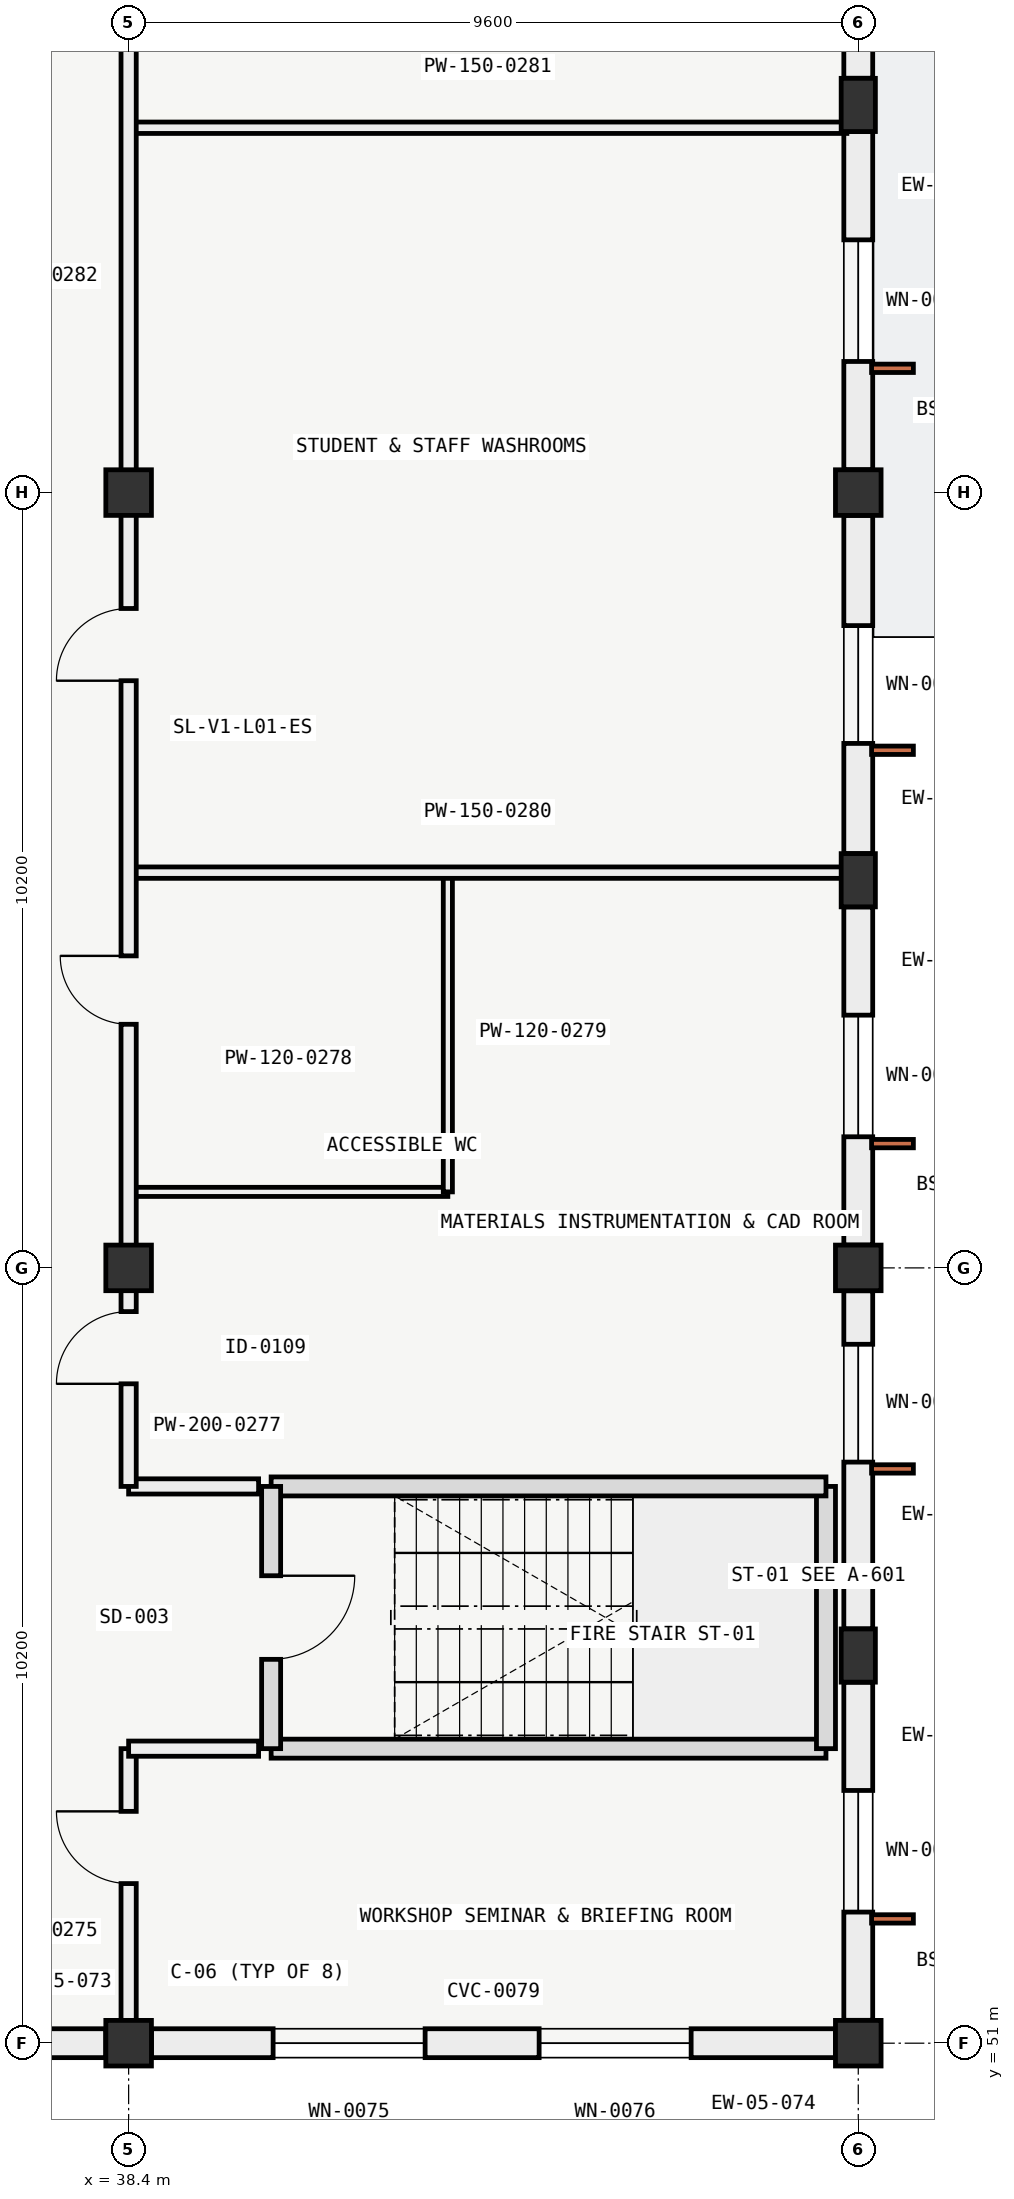
"""IFC4 building model, lengths in metres.
Left out: names, types, materials, properties, quantities, classifications, styles, units other than length and angle.
Written with IfcOpenShell. Run it as: python <this file> out.ifc"""

import sys

from ifc_helpers import new_model, si_unit, direction, frame, frame_2d, origin, origin_2d, place, context, subcontext, project, spatial, rectangle, extrude, element, fill, save


model = new_model("IFC4")
c1 = context("Model", 3, precision=1e-05, world=origin(), true_north=direction((0.0, 1.0)))
c2 = subcontext(c1, "Body", "Model", "MODEL_VIEW")
j1 = project(units=[si_unit("LENGTHUNIT", "METRE"), si_unit("PLANEANGLEUNIT", "RADIAN")], contexts=[c1])
p1 = place(None, origin())
s1 = spatial("IfcSite", under=j1, at=p1, CompositionType="ELEMENT")
p2 = place(p1, origin())
s2 = spatial("IfcBuilding", under=s1, at=p2, CompositionType="ELEMENT")
p3 = place(p2, frame((0.0, 0.0, 5.4)))
s3 = spatial("IfcBuildingStorey", under=s2, at=p3, CompositionType="ELEMENT", Elevation=5.4)
for number, where, z_axis, x_axis in (
    (1, (38.4, 51.0, 0.0), (0.0, 0.0, 1.0), (1.0, 0.0, 0.0)),
    (2, (48.0, 51.0, 0.0), (0.0, 0.0, 1.0), (1.0, 0.0, 0.0)),
    (3, (38.4, 61.2, 0.0), (0.0, 0.0, 1.0), (1.0, 0.0, 0.0)),
    (4, (48.0, 61.2, 0.0), (0.0, 0.0, 1.0), (1.0, 0.0, 0.0)),
    (5, (38.4, 71.4, 0.0), (0.0, 0.0, 1.0), (1.0, 0.0, 0.0)),
    (6, (48.0, 71.4, 0.0), (0.0, 0.0, 1.0), (1.0, 0.0, 0.0)),
):
    element("IfcColumn", number, at=place(p3, frame(where, z_axis=z_axis, x_axis=x_axis)), inside=s3, PredefinedType="COLUMN", context=c2, shape_type="SweptSolid", body=[
        extrude(rectangle(XDim=0.6, YDim=0.6, at=origin_2d()), origin(), (0.0, 0.0, 1.0), 4.2),
    ])
for number, where, z_axis, x_axis in (
    (7, (48.0, 56.1, 0.0), (0.0, 0.0, 1.0), (1.0, 0.0, 0.0)),
    (8, (48.0, 66.3, 0.0), (0.0, 0.0, 1.0), (1.0, 0.0, 0.0)),
    (9, (48.0, 76.5, 0.0), (0.0, 0.0, 1.0), (1.0, 0.0, 0.0)),
):
    element("IfcColumn", number, at=place(p3, frame(where, z_axis=z_axis, x_axis=x_axis)), inside=s3, PredefinedType="PILASTER", context=c2, shape_type="SweptSolid", body=[
        extrude(rectangle(XDim=0.45, YDim=0.7, at=origin_2d()), origin(), (0.0, 0.0, 1.0), 4.2),
    ])
p4 = place(p3, frame((48.0, 55.749, 0.0), z_axis=(0.0, 0.0, 1.0), x_axis=(0.0, -1.0, 0.0)))
e10 = element("IfcWall", 10, at=p4, inside=s3, PredefinedType="SOLIDWALL", context=c2, shape_type="SweptSolid", body=[
    extrude(rectangle(XDim=4.448, YDim=0.38, at=frame_2d((2.224, 0.0))), origin(), (0.0, 0.0, 1.0), 3.25),
])
p5 = place(p4, frame((1.424, 0.0, 0.95)))
e11 = element("IfcOpeningElement", 11, at=p5, cuts=e10, PredefinedType="OPENING", context=c2, shape_type="SweptSolid", body=[
    extrude(rectangle(XDim=1.6, YDim=1.9, at=frame_2d((0.8, 0.95))), frame((0.0, 0.2, 0.0), z_axis=(0.0, -1.0, 0.0), x_axis=(1.0, 0.0, 0.0)), (0.0, 0.0, 1.0), 0.4),
])
p6 = place(p3, frame((48.0, 60.899, 0.0), z_axis=(0.0, 0.0, 1.0), x_axis=(0.0, -1.0, 0.0)))
e12 = element("IfcWall", 12, at=p6, inside=s3, PredefinedType="SOLIDWALL", context=c2, shape_type="SweptSolid", body=[
    extrude(rectangle(XDim=4.448, YDim=0.38, at=frame_2d((2.224, 0.0))), origin(), (0.0, 0.0, 1.0), 3.25),
])
p7 = place(p6, frame((0.704, 0.0, 0.95)))
e13 = element("IfcOpeningElement", 13, at=p7, cuts=e12, PredefinedType="OPENING", context=c2, shape_type="SweptSolid", body=[
    extrude(rectangle(XDim=1.55, YDim=1.85, at=frame_2d((0.775, 0.925))), frame((0.0, 0.2, 0.0), z_axis=(0.0, -1.0, 0.0), x_axis=(1.0, 0.0, 0.0)), (0.0, 0.0, 1.0), 0.4),
])
p8 = place(p3, frame((48.0, 65.949, 0.0), z_axis=(0.0, 0.0, 1.0), x_axis=(0.0, -1.0, 0.0)))
e14 = element("IfcWall", 14, at=p8, inside=s3, PredefinedType="SOLIDWALL", context=c2, shape_type="SweptSolid", body=[
    extrude(rectangle(XDim=4.448, YDim=0.38, at=frame_2d((2.224, 0.0))), origin(), (0.0, 0.0, 1.0), 3.25),
])
p9 = place(p8, frame((1.424, 0.0, 0.95)))
e15 = element("IfcOpeningElement", 15, at=p9, cuts=e14, PredefinedType="OPENING", context=c2, shape_type="SweptSolid", body=[
    extrude(rectangle(XDim=1.6, YDim=1.9, at=frame_2d((0.8, 0.95))), frame((0.0, 0.2, 0.0), z_axis=(0.0, -1.0, 0.0), x_axis=(1.0, 0.0, 0.0)), (0.0, 0.0, 1.0), 0.4),
])
p10 = place(p3, frame((48.0, 71.099, 0.0), z_axis=(0.0, 0.0, 1.0), x_axis=(0.0, -1.0, 0.0)))
e16 = element("IfcWall", 16, at=p10, inside=s3, PredefinedType="SOLIDWALL", context=c2, shape_type="SweptSolid", body=[
    extrude(rectangle(XDim=4.448, YDim=0.38, at=frame_2d((2.224, 0.0))), origin(), (0.0, 0.0, 1.0), 3.25),
])
p11 = place(p10, frame((1.449, 0.0, 0.95)))
e17 = element("IfcOpeningElement", 17, at=p11, cuts=e16, PredefinedType="OPENING", context=c2, shape_type="SweptSolid", body=[
    extrude(rectangle(XDim=1.55, YDim=1.85, at=frame_2d((0.775, 0.925))), frame((0.0, 0.2, 0.0), z_axis=(0.0, -1.0, 0.0), x_axis=(1.0, 0.0, 0.0)), (0.0, 0.0, 1.0), 0.4),
])
p12 = place(p3, frame((48.0, 76.149, 0.0), z_axis=(0.0, 0.0, 1.0), x_axis=(0.0, -1.0, 0.0)))
e18 = element("IfcWall", 18, at=p12, inside=s3, PredefinedType="SOLIDWALL", context=c2, shape_type="SweptSolid", body=[
    extrude(rectangle(XDim=4.448, YDim=0.38, at=frame_2d((2.224, 0.0))), origin(), (0.0, 0.0, 1.0), 3.25),
])
p13 = place(p12, frame((1.424, 0.0, 0.95)))
e19 = element("IfcOpeningElement", 19, at=p13, cuts=e18, PredefinedType="OPENING", context=c2, shape_type="SweptSolid", body=[
    extrude(rectangle(XDim=1.6, YDim=1.9, at=frame_2d((0.8, 0.95))), frame((0.0, 0.2, 0.0), z_axis=(0.0, -1.0, 0.0), x_axis=(1.0, 0.0, 0.0)), (0.0, 0.0, 1.0), 0.4),
])
p14 = place(p3, frame((48.0, 81.299, 0.0), z_axis=(0.0, 0.0, 1.0), x_axis=(0.0, -1.0, 0.0)))
e20 = element("IfcWall", 20, at=p14, inside=s3, PredefinedType="SOLIDWALL", context=c2, shape_type="SweptSolid", body=[
    extrude(rectangle(XDim=4.448, YDim=0.38, at=frame_2d((2.224, 0.0))), origin(), (0.0, 0.0, 1.0), 3.25),
])
p15 = place(p14, frame((1.449, 0.0, 0.95)))
e21 = element("IfcOpeningElement", 21, at=p15, cuts=e20, PredefinedType="OPENING", context=c2, shape_type="SweptSolid", body=[
    extrude(rectangle(XDim=1.55, YDim=1.85, at=frame_2d((0.775, 0.925))), frame((0.0, 0.2, 0.0), z_axis=(0.0, -1.0, 0.0), x_axis=(1.0, 0.0, 0.0)), (0.0, 0.0, 1.0), 0.4),
])
p16 = place(p3, frame((38.099, 51.0, 0.0), z_axis=(0.0, 0.0, 1.0), x_axis=(-1.0, 0.0, 0.0)))
e22 = element("IfcWall", 22, at=p16, inside=s3, PredefinedType="SOLIDWALL", context=c2, shape_type="SweptSolid", body=[
    extrude(rectangle(XDim=2.699, YDim=0.38, at=frame_2d((1.35, 0.0))), origin(), (0.0, 0.0, 1.0), 3.298),
])
p17 = place(p16, frame((0.899, 0.0, 0.85)))
e23 = element("IfcOpeningElement", 23, at=p17, cuts=e22, PredefinedType="OPENING", context=c2, shape_type="SweptSolid", body=[
    extrude(rectangle(XDim=0.9, YDim=2.2, at=frame_2d((0.45, 1.1))), frame((0.0, 0.2, 0.0), z_axis=(0.0, -1.0, 0.0), x_axis=(1.0, 0.0, 0.0)), (0.0, 0.0, 1.0), 0.4),
])
p18 = place(p3, frame((47.699, 51.0, 0.0), z_axis=(0.0, 0.0, 1.0), x_axis=(-1.0, 0.0, 0.0)))
e24 = element("IfcWall", 24, at=p18, inside=s3, PredefinedType="SOLIDWALL", context=c2, shape_type="SweptSolid", body=[
    extrude(rectangle(XDim=8.998, YDim=0.38, at=frame_2d((4.499, 0.0))), origin(), (0.0, 0.0, 1.0), 3.32),
])
p19 = place(p18, frame((5.398, 0.0, 0.85)))
e25 = element("IfcOpeningElement", 25, at=p19, cuts=e24, PredefinedType="OPENING", context=c2, shape_type="SweptSolid", body=[
    extrude(rectangle(XDim=2.0, YDim=1.35, at=frame_2d((1.0, 0.675))), frame((0.0, 0.2, 0.0), z_axis=(0.0, -1.0, 0.0), x_axis=(1.0, 0.0, 0.0)), (0.0, 0.0, 1.0), 0.4),
])
p20 = place(p18, frame((1.898, 0.0, 0.85)))
e26 = element("IfcOpeningElement", 26, at=p20, cuts=e24, PredefinedType="OPENING", context=c2, shape_type="SweptSolid", body=[
    extrude(rectangle(XDim=2.0, YDim=1.35, at=frame_2d((1.0, 0.675))), frame((0.0, 0.2, 0.0), z_axis=(0.0, -1.0, 0.0), x_axis=(1.0, 0.0, 0.0)), (0.0, 0.0, 1.0), 0.4),
])
p21 = place(p3, frame((40.275, 54.875, 0.0), z_axis=(0.0, 0.0, 1.0), x_axis=(1.0, 0.0, 0.0)))
e27 = element("IfcWall", 27, at=p21, inside=s3, PredefinedType="SOLIDWALL", context=c2, shape_type="SweptSolid", body=[
    extrude(rectangle(XDim=7.3, YDim=0.25, at=frame_2d((3.65, 0.0))), origin(), (0.0, 0.0, 1.0), 3.92),
])
p22 = place(p3, frame((47.575, 54.875, 0.0), z_axis=(0.0, 0.0, 1.0), x_axis=(0.0, 1.0, 0.0)))
e28 = element("IfcWall", 28, at=p22, inside=s3, PredefinedType="SOLIDWALL", context=c2, shape_type="SweptSolid", body=[
    extrude(rectangle(XDim=3.45, YDim=0.25, at=frame_2d((1.725, 0.0))), origin(), (0.0, 0.0, 1.0), 3.92),
])
p23 = place(p3, frame((47.575, 58.325, 0.0), z_axis=(0.0, 0.0, 1.0), x_axis=(-1.0, 0.0, 0.0)))
e29 = element("IfcWall", 29, at=p23, inside=s3, PredefinedType="SOLIDWALL", context=c2, shape_type="SweptSolid", body=[
    extrude(rectangle(XDim=7.3, YDim=0.25, at=frame_2d((3.65, 0.0))), origin(), (0.0, 0.0, 1.0), 3.92),
])
p24 = place(p3, frame((40.275, 58.325, 0.0), z_axis=(0.0, 0.0, 1.0), x_axis=(0.0, -1.0, 0.0)))
e30 = element("IfcWall", 30, at=p24, inside=s3, PredefinedType="SOLIDWALL", context=c2, shape_type="SweptSolid", body=[
    extrude(rectangle(XDim=3.45, YDim=0.25, at=frame_2d((1.725, 0.0))), origin(), (0.0, 0.0, 1.0), 3.92),
])
p25 = place(p24, frame((1.175, 0.0, 0.0)))
e31 = element("IfcOpeningElement", 31, at=p25, cuts=e30, PredefinedType="OPENING", context=c2, shape_type="SweptSolid", body=[
    extrude(rectangle(XDim=1.1, YDim=2.2, at=frame_2d((0.55, 1.1))), frame((0.0, 0.135, 0.0), z_axis=(0.0, -1.0, 0.0), x_axis=(1.0, 0.0, 0.0)), (0.0, 0.0, 1.0), 0.27),
])
p26 = place(p3, frame((38.4, 51.15, 0.0), z_axis=(0.0, 0.0, 1.0), x_axis=(0.0, 1.0, 0.0)))
e32 = element("IfcWall", 32, at=p26, inside=s3, PredefinedType="PARTITIONING", context=c2, shape_type="SweptSolid", body=[
    extrude(rectangle(XDim=3.725, YDim=0.2, at=frame_2d((1.863, 0.0))), origin(), (0.0, 0.0, 1.0), 3.443),
])
p27 = place(p26, frame((1.95, 0.0, 0.0)))
e33 = element("IfcOpeningElement", 33, at=p27, cuts=e32, PredefinedType="OPENING", context=c2, shape_type="SweptSolid", body=[
    extrude(rectangle(XDim=0.95, YDim=2.1, at=frame_2d((0.475, 1.05))), frame((0.0, 0.11, 0.0), z_axis=(0.0, -1.0, 0.0), x_axis=(1.0, 0.0, 0.0)), (0.0, 0.0, 1.0), 0.22),
])
for number, where, z_axis, x_axis in (
    (34, (38.4, 54.875, 0.0), (0.0, 0.0, 1.0), (1.0, 0.0, 0.0)),
    (35, (38.4, 58.325, 0.0), (0.0, 0.0, 1.0), (1.0, 0.0, 0.0)),
):
    element("IfcWall", number, at=place(p3, frame(where, z_axis=z_axis, x_axis=x_axis)), inside=s3, PredefinedType="PARTITIONING", context=c2, shape_type="SweptSolid", body=[
        extrude(rectangle(XDim=1.71, YDim=0.2, at=frame_2d((0.855, 0.0))), origin(), (0.0, 0.0, 1.0), 3.443),
    ])
p28 = place(p3, frame((38.4, 62.2, 0.0), z_axis=(0.0, 0.0, 1.0), x_axis=(1.0, 0.0, 0.0)))
e36 = element("IfcWall", 36, at=p28, inside=s3, PredefinedType="PARTITIONING", context=c2, shape_type="SweptSolid", body=[
    extrude(rectangle(XDim=4.2, YDim=0.12, at=frame_2d((2.1, 0.0))), origin(), (0.0, 0.0, 1.0), 3.443),
])
p29 = place(p3, frame((42.6, 62.2, 0.0), z_axis=(0.0, 0.0, 1.0), x_axis=(0.0, 1.0, 0.0)))
e37 = element("IfcWall", 37, at=p29, inside=s3, PredefinedType="PARTITIONING", context=c2, shape_type="SweptSolid", body=[
    extrude(rectangle(XDim=4.2, YDim=0.12, at=frame_2d((2.1, 0.0))), origin(), (0.0, 0.0, 1.0), 3.596),
])
for number, where, z_axis, x_axis in (
    (38, (38.4, 66.4, 0.0), (0.0, 0.0, 1.0), (1.0, 0.0, 0.0)),
    (39, (38.4, 76.2, 0.0), (0.0, 0.0, 1.0), (1.0, 0.0, 0.0)),
):
    element("IfcWall", number, at=place(p3, frame(where, z_axis=z_axis, x_axis=x_axis)), inside=s3, PredefinedType="PARTITIONING", context=c2, shape_type="SweptSolid", body=[
        extrude(rectangle(XDim=9.45, YDim=0.15, at=frame_2d((4.725, 0.0))), origin(), (0.0, 0.0, 1.0), 3.443),
    ])
p30 = place(p3, frame((38.4, 58.325, 0.0), z_axis=(0.0, 0.0, 1.0), x_axis=(0.0, 1.0, 0.0)))
e40 = element("IfcWall", 40, at=p30, inside=s3, PredefinedType="PARTITIONING", context=c2, shape_type="SweptSolid", body=[
    extrude(rectangle(XDim=26.7, YDim=0.2, at=frame_2d((13.35, 0.0))), origin(), (0.0, 0.0, 1.0), 3.298),
])
p31 = place(p30, frame((1.35, 0.0, 0.0)))
e41 = element("IfcOpeningElement", 41, at=p31, cuts=e40, PredefinedType="OPENING", context=c2, shape_type="SweptSolid", body=[
    extrude(rectangle(XDim=0.95, YDim=2.1, at=frame_2d((0.475, 1.05))), frame((0.0, 0.11, 0.0), z_axis=(0.0, -1.0, 0.0), x_axis=(1.0, 0.0, 0.0)), (0.0, 0.0, 1.0), 0.22),
])
p32 = place(p30, frame((6.08, 0.0, 0.0)))
e42 = element("IfcOpeningElement", 42, at=p32, cuts=e40, PredefinedType="OPENING", context=c2, shape_type="SweptSolid", body=[
    extrude(rectangle(XDim=0.9, YDim=2.05, at=frame_2d((0.45, 1.025))), frame((0.0, 0.11, 0.0), z_axis=(0.0, -1.0, 0.0), x_axis=(1.0, 0.0, 0.0)), (0.0, 0.0, 1.0), 0.22),
])
p33 = place(p30, frame((10.6, 0.0, 0.0)))
e43 = element("IfcOpeningElement", 43, at=p33, cuts=e40, PredefinedType="OPENING", context=c2, shape_type="SweptSolid", body=[
    extrude(rectangle(XDim=0.95, YDim=2.1, at=frame_2d((0.475, 1.05))), frame((0.0, 0.11, 0.0), z_axis=(0.0, -1.0, 0.0), x_axis=(1.0, 0.0, 0.0)), (0.0, 0.0, 1.0), 0.22),
])
p34 = place(p30, frame((20.3, 0.0, 0.0)))
e44 = element("IfcOpeningElement", 44, at=p34, cuts=e40, PredefinedType="OPENING", context=c2, shape_type="SweptSolid", body=[
    extrude(rectangle(XDim=0.95, YDim=2.1, at=frame_2d((0.475, 1.05))), frame((0.0, 0.11, 0.0), z_axis=(0.0, -1.0, 0.0), x_axis=(1.0, 0.0, 0.0)), (0.0, 0.0, 1.0), 0.22),
])
p35 = place(p5, origin())
e45 = element("IfcWindow", 45, at=p35, inside=s3, PartitioningType="SINGLE_PANEL", PredefinedType="WINDOW", context=c2, shape_type="SweptSolid", body=[
    extrude(rectangle(XDim=1.6, YDim=1.9, at=frame_2d((0.8, 0.95))), frame((0.0, 0.03, 0.0), z_axis=(0.0, -1.0, 0.0), x_axis=(1.0, 0.0, 0.0)), (0.0, 0.0, 1.0), 0.06),
])
fill(e11, e45)
p36 = place(p7, origin())
e46 = element("IfcWindow", 46, at=p36, inside=s3, PartitioningType="SINGLE_PANEL", PredefinedType="WINDOW", context=c2, shape_type="SweptSolid", body=[
    extrude(rectangle(XDim=1.55, YDim=1.85, at=frame_2d((0.775, 0.925))), frame((0.0, 0.03, 0.0), z_axis=(0.0, -1.0, 0.0), x_axis=(1.0, 0.0, 0.0)), (0.0, 0.0, 1.0), 0.06),
])
fill(e13, e46)
p37 = place(p9, origin())
e47 = element("IfcWindow", 47, at=p37, inside=s3, PartitioningType="SINGLE_PANEL", PredefinedType="WINDOW", context=c2, shape_type="SweptSolid", body=[
    extrude(rectangle(XDim=1.6, YDim=1.9, at=frame_2d((0.8, 0.95))), frame((0.0, 0.03, 0.0), z_axis=(0.0, -1.0, 0.0), x_axis=(1.0, 0.0, 0.0)), (0.0, 0.0, 1.0), 0.06),
])
fill(e15, e47)
p38 = place(p11, origin())
e48 = element("IfcWindow", 48, at=p38, inside=s3, PartitioningType="SINGLE_PANEL", PredefinedType="WINDOW", context=c2, shape_type="SweptSolid", body=[
    extrude(rectangle(XDim=1.55, YDim=1.85, at=frame_2d((0.775, 0.925))), frame((0.0, 0.03, 0.0), z_axis=(0.0, -1.0, 0.0), x_axis=(1.0, 0.0, 0.0)), (0.0, 0.0, 1.0), 0.06),
])
fill(e17, e48)
p39 = place(p13, origin())
e49 = element("IfcWindow", 49, at=p39, inside=s3, PartitioningType="SINGLE_PANEL", PredefinedType="WINDOW", context=c2, shape_type="SweptSolid", body=[
    extrude(rectangle(XDim=1.6, YDim=1.9, at=frame_2d((0.8, 0.95))), frame((0.0, 0.03, 0.0), z_axis=(0.0, -1.0, 0.0), x_axis=(1.0, 0.0, 0.0)), (0.0, 0.0, 1.0), 0.06),
])
fill(e19, e49)
p40 = place(p19, origin())
e50 = element("IfcWindow", 50, at=p40, inside=s3, PartitioningType="SINGLE_PANEL", PredefinedType="WINDOW", context=c2, shape_type="SweptSolid", body=[
    extrude(rectangle(XDim=2.0, YDim=1.35, at=frame_2d((1.0, 0.675))), frame((0.0, 0.03, 0.0), z_axis=(0.0, -1.0, 0.0), x_axis=(1.0, 0.0, 0.0)), (0.0, 0.0, 1.0), 0.06),
])
fill(e25, e50)
p41 = place(p20, origin())
e51 = element("IfcWindow", 51, at=p41, inside=s3, PartitioningType="SINGLE_PANEL", PredefinedType="WINDOW", context=c2, shape_type="SweptSolid", body=[
    extrude(rectangle(XDim=2.0, YDim=1.35, at=frame_2d((1.0, 0.675))), frame((0.0, 0.03, 0.0), z_axis=(0.0, -1.0, 0.0), x_axis=(1.0, 0.0, 0.0)), (0.0, 0.0, 1.0), 0.06),
])
fill(e26, e51)
p42 = place(p25, origin())
e52 = element("IfcDoor", 52, at=p42, inside=s3, OperationType="SINGLE_SWING_LEFT", PredefinedType="DOOR", context=c2, shape_type="SweptSolid", body=[
    extrude(rectangle(XDim=1.1, YDim=2.2, at=frame_2d((0.55, 1.1))), frame((0.0, 0.025, 0.0), z_axis=(0.0, -1.0, 0.0), x_axis=(1.0, 0.0, 0.0)), (0.0, 0.0, 1.0), 0.05),
])
fill(e31, e52)
p43 = place(p27, origin())
e53 = element("IfcDoor", 53, at=p43, inside=s3, OperationType="SINGLE_SWING_RIGHT", PredefinedType="DOOR", context=c2, shape_type="SweptSolid", body=[
    extrude(rectangle(XDim=0.95, YDim=2.1, at=frame_2d((0.475, 1.05))), frame((0.0, 0.025, 0.0), z_axis=(0.0, -1.0, 0.0), x_axis=(1.0, 0.0, 0.0)), (0.0, 0.0, 1.0), 0.05),
])
fill(e33, e53)
p44 = place(p31, origin())
e54 = element("IfcDoor", 54, at=p44, inside=s3, OperationType="SINGLE_SWING_LEFT", PredefinedType="DOOR", context=c2, shape_type="SweptSolid", body=[
    extrude(rectangle(XDim=0.95, YDim=2.1, at=frame_2d((0.475, 1.05))), frame((0.0, 0.025, 0.0), z_axis=(0.0, -1.0, 0.0), x_axis=(1.0, 0.0, 0.0)), (0.0, 0.0, 1.0), 0.05),
])
fill(e41, e54)
p45 = place(p32, origin())
e55 = element("IfcDoor", 55, at=p45, inside=s3, OperationType="SINGLE_SWING_RIGHT", PredefinedType="DOOR", context=c2, shape_type="SweptSolid", body=[
    extrude(rectangle(XDim=0.9, YDim=2.05, at=frame_2d((0.45, 1.025))), frame((0.0, 0.025, 0.0), z_axis=(0.0, -1.0, 0.0), x_axis=(1.0, 0.0, 0.0)), (0.0, 0.0, 1.0), 0.05),
])
fill(e42, e55)
p46 = place(p33, origin())
e56 = element("IfcDoor", 56, at=p46, inside=s3, OperationType="SINGLE_SWING_LEFT", PredefinedType="DOOR", context=c2, shape_type="SweptSolid", body=[
    extrude(rectangle(XDim=0.95, YDim=2.1, at=frame_2d((0.475, 1.05))), frame((0.0, 0.025, 0.0), z_axis=(0.0, -1.0, 0.0), x_axis=(1.0, 0.0, 0.0)), (0.0, 0.0, 1.0), 0.05),
])
fill(e43, e56)
save(model, sys.argv[1])
